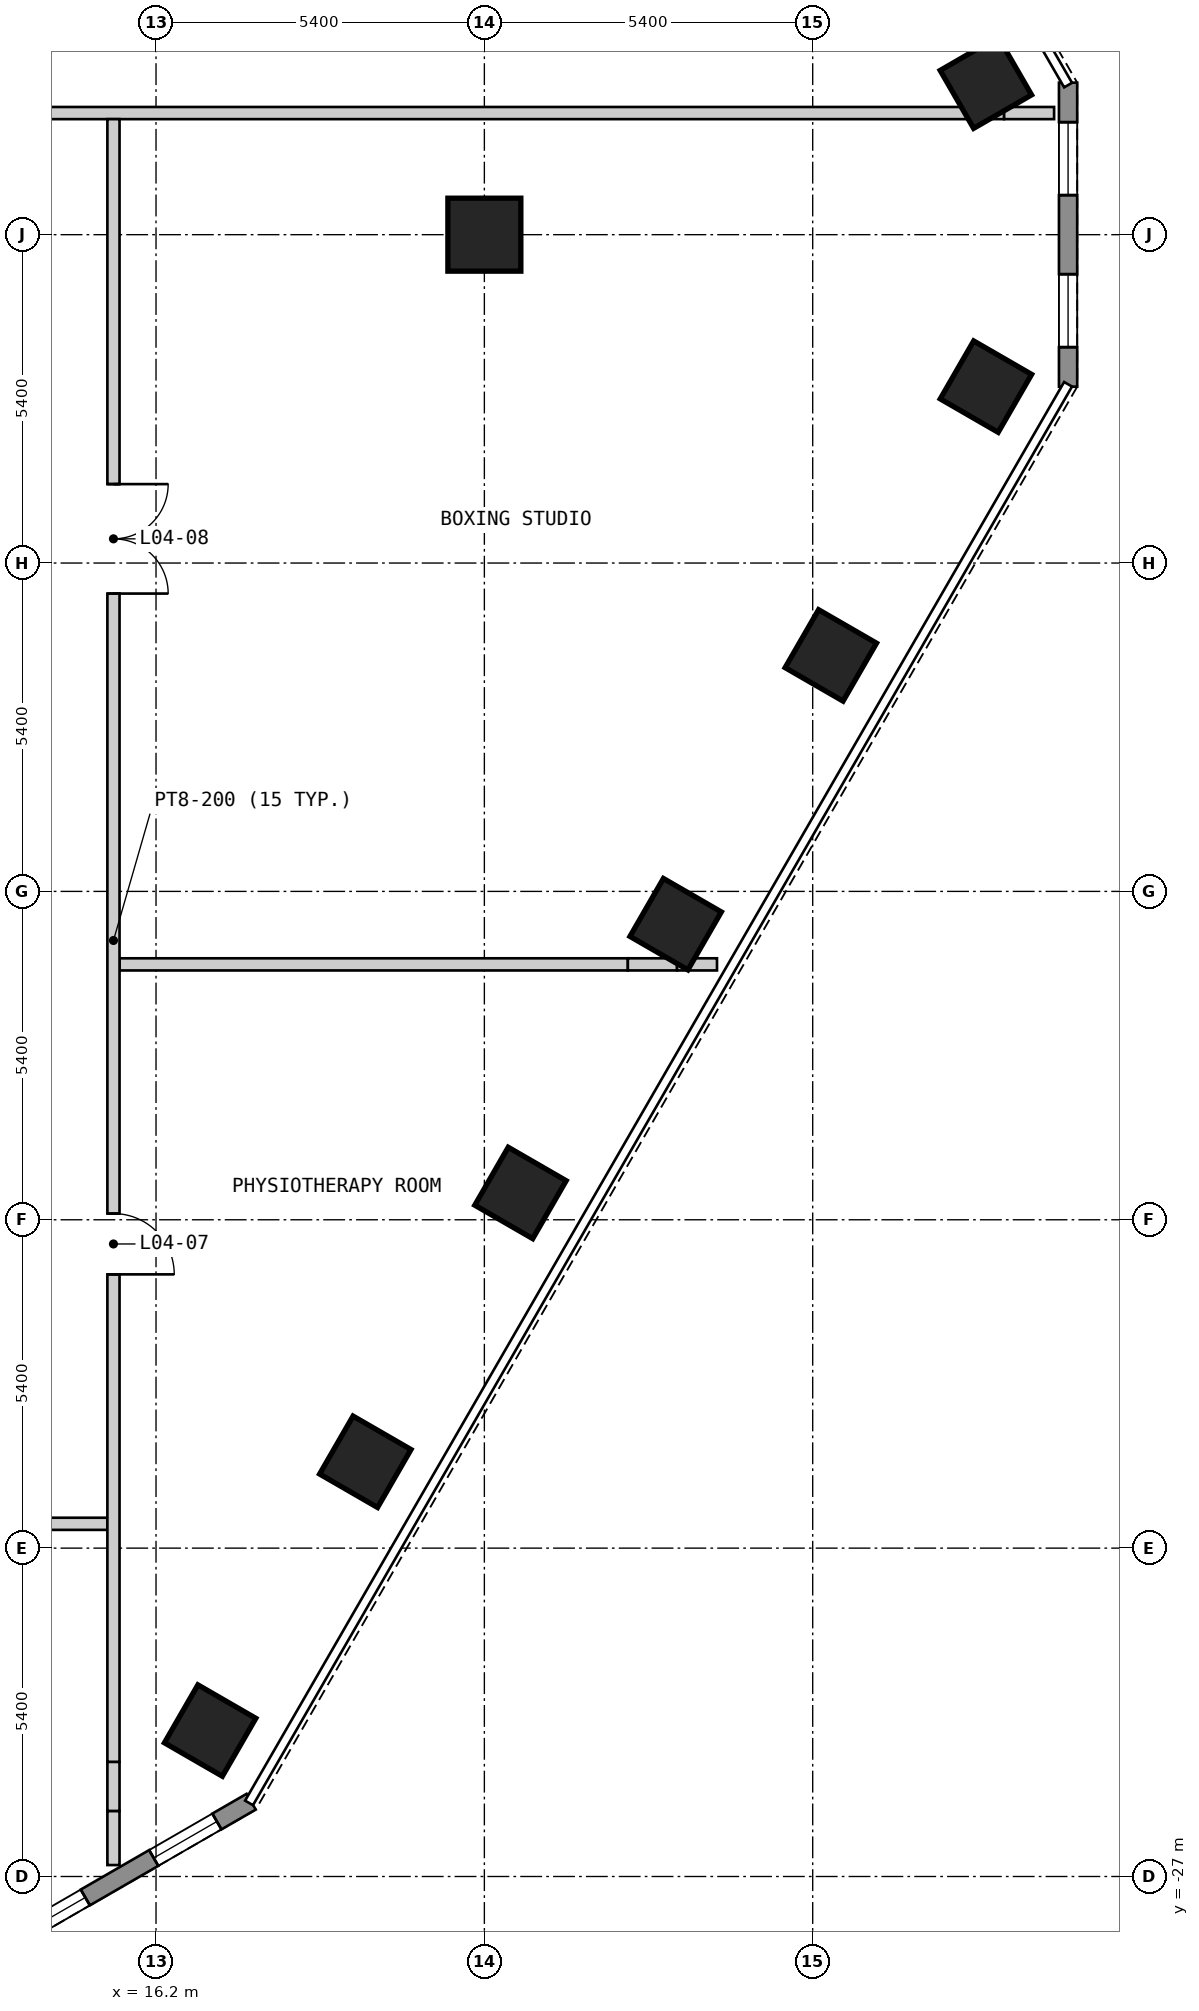
"""IFC4 building model, lengths in metres.
Left out: names, types, materials, properties, quantities, classifications, styles, units other than length and angle.
Written with IfcOpenShell. Run it as: python <this file> out.ifc"""

import sys

from ifc_helpers import new_model, si_unit, direction, frame, frame_2d, origin, origin_2d, place, context, subcontext, project, spatial, polyline, rectangle, outline, extrude, element, fill, save


model = new_model("IFC4")
c1 = context("Model", 3, precision=1e-05, world=origin(), true_north=direction((0.0, 1.0)))
c2 = subcontext(c1, "Body", "Model", "MODEL_VIEW")
j1 = project(units=[si_unit("LENGTHUNIT", "METRE"), si_unit("PLANEANGLEUNIT", "RADIAN")], contexts=[c1])
p1 = place(None, origin())
s1 = spatial("IfcSite", under=j1, at=p1, CompositionType="ELEMENT")
p2 = place(p1, origin())
s2 = spatial("IfcBuilding", under=s1, at=p2, CompositionType="ELEMENT")
p3 = place(p2, frame((0.0, 0.0, 16.2)))
s3 = spatial("IfcBuildingStorey", under=s2, at=p3, CompositionType="ELEMENT", Elevation=16.2)
for number, where, z_axis, x_axis in (
    (1, (17.09, -24.6, 0.0), (0.0, 0.0, 1.0), (0.5, 0.866, 0.0)),
    (2, (19.642, -20.18, 0.0), (0.0, 0.0, 1.0), (0.5, 0.866, 0.0)),
    (3, (22.194, -15.759, 0.0), (0.0, 0.0, 1.0), (0.5, 0.866, 0.0)),
    (4, (24.746, -11.339, 0.0), (0.0, 0.0, 1.0), (0.5, 0.866, 0.0)),
    (5, (27.298, -6.919, 0.0), (0.0, 0.0, 1.0), (0.5, 0.866, 0.0)),
    (6, (29.849, -2.499, 0.0), (0.0, 0.0, 1.0), (0.5, 0.866, 0.0)),
    (7, (29.848, 2.5, 0.0), (0.0, 0.0, 1.0), (-0.5, 0.866, 0.0)),
):
    element("IfcColumn", number, at=place(p3, frame(where, z_axis=z_axis, x_axis=x_axis)), inside=s3, PredefinedType="COLUMN", context=c2, shape_type="SweptSolid", body=[
        extrude(rectangle(XDim=1.1, YDim=1.1, at=origin_2d()), origin(), (0.0, 0.0, 1.0), 3.6),
    ])
p4 = place(p3, frame((21.6, 0.0, 0.0), z_axis=(0.0, 0.0, 1.0), x_axis=(1.0, 0.0, 0.0)))
e8 = element("IfcColumn", 8, at=p4, inside=s3, PredefinedType="COLUMN", context=c2, shape_type="SweptSolid", body=[
    extrude(rectangle(XDim=1.2, YDim=1.2, at=origin_2d()), origin(), (0.0, 0.0, 1.0), 3.6),
])
p5 = place(p3, frame((13.435, -28.27, 0.0), z_axis=(0.0, 0.0, 1.0), x_axis=(0.866010750942, 0.50002537861, 0.0)))
e9 = element("IfcWall", 9, at=p5, inside=s3, PredefinedType="SOLIDWALL", context=c2, shape_type="SweptSolid", body=[
    extrude(outline(polyline([(0.0, -0.15), (5.0, -0.15), (4.919, 0.15), (0.08, 0.15), (0.0, -0.15)])), origin(), (0.0, 0.0, 1.0), 3.25),
])
p6 = place(p5, frame((0.65, 0.0, 0.15)))
e10 = element("IfcOpeningElement", 10, at=p6, cuts=e9, PredefinedType="OPENING", context=c2, shape_type="SweptSolid", body=[
    extrude(rectangle(XDim=1.2, YDim=2.1, at=frame_2d((0.6, 1.05))), frame((0.0, 0.16, 0.0), z_axis=(0.0, -1.0, 0.0), x_axis=(1.0, 0.0, 0.0)), (0.0, 0.0, 1.0), 0.32),
])
p7 = place(p5, frame((3.149, 0.0, 0.15)))
e11 = element("IfcOpeningElement", 11, at=p7, cuts=e9, PredefinedType="OPENING", context=c2, shape_type="SweptSolid", body=[
    extrude(rectangle(XDim=1.2, YDim=2.1, at=frame_2d((0.6, 1.05))), frame((0.0, 0.16, 0.0), z_axis=(0.0, -1.0, 0.0), x_axis=(1.0, 0.0, 0.0)), (0.0, 0.0, 1.0), 0.32),
])
p8 = place(p3, frame((31.2, -2.5, 0.0), z_axis=(0.0, 0.0, 1.0), x_axis=(0.0, 1.0, 0.0)))
e12 = element("IfcWall", 12, at=p8, inside=s3, PredefinedType="SOLIDWALL", context=c2, shape_type="SweptSolid", body=[
    extrude(outline(polyline([(0.0, -0.15), (5.0, -0.15), (4.92, 0.15), (0.08, 0.15), (0.0, -0.15)])), origin(), (0.0, 0.0, 1.0), 3.25),
])
p9 = place(p8, frame((0.65, 0.0, 0.15)))
e13 = element("IfcOpeningElement", 13, at=p9, cuts=e12, PredefinedType="OPENING", context=c2, shape_type="SweptSolid", body=[
    extrude(rectangle(XDim=1.2, YDim=2.1, at=frame_2d((0.6, 1.05))), frame((0.0, 0.16, 0.0), z_axis=(0.0, -1.0, 0.0), x_axis=(1.0, 0.0, 0.0)), (0.0, 0.0, 1.0), 0.32),
])
p10 = place(p8, frame((3.15, 0.0, 0.15)))
e14 = element("IfcOpeningElement", 14, at=p10, cuts=e12, PredefinedType="OPENING", context=c2, shape_type="SweptSolid", body=[
    extrude(rectangle(XDim=1.2, YDim=2.1, at=frame_2d((0.6, 1.05))), frame((0.0, 0.16, 0.0), z_axis=(0.0, -1.0, 0.0), x_axis=(1.0, 0.0, 0.0)), (0.0, 0.0, 1.0), 0.32),
])
p11 = place(p3, frame((9.7, -21.2, 0.0), z_axis=(0.0, 0.0, 1.0), x_axis=(1.0, 0.0, 0.0)))
e15 = element("IfcWall", 15, at=p11, inside=s3, PredefinedType="PARTITIONING", context=c2, shape_type="SweptSolid", body=[
    extrude(rectangle(XDim=5.7, YDim=0.2, at=frame_2d((2.85, 0.0))), origin(), (0.0, 0.0, 1.0), 3.25),
])
p12 = place(p3, frame((15.6, -12.0, 0.0), z_axis=(0.0, 0.0, 1.0), x_axis=(1.0, 0.0, 0.0)))
e16 = element("IfcWall", 16, at=p12, inside=s3, PredefinedType="PARTITIONING", context=c2, shape_type="SweptSolid", body=[
    extrude(rectangle(XDim=8.36, YDim=0.2, at=frame_2d((4.18, 0.0))), origin(), (0.0, 0.0, 1.0), 3.25),
])
p13 = place(p3, frame((23.96, -12.0, 0.0), z_axis=(0.0, 0.0, 1.0), x_axis=(1.0, 0.0, 0.0)))
e17 = element("IfcWall", 17, at=p13, inside=s3, PredefinedType="PARTITIONING", context=c2, shape_type="SweptSolid", body=[
    extrude(rectangle(XDim=0.809, YDim=0.2, at=frame_2d((0.405, 0.0))), origin(), (0.0, 0.0, 1.0), 2.52),
])
p14 = place(p3, frame((24.769, -12.0, 0.0), z_axis=(0.0, 0.0, 1.0), x_axis=(1.0, 0.0, 0.0)))
e18 = element("IfcWall", 18, at=p14, inside=s3, PredefinedType="PARTITIONING", context=c2, shape_type="SweptSolid", body=[
    extrude(rectangle(XDim=0.657, YDim=0.2, at=frame_2d((0.329, 0.0))), origin(), (0.0, 0.0, 1.0), 3.25),
])
p15 = place(p3, frame((-29.549, 2.0, 0.0), z_axis=(0.0, 0.0, 1.0), x_axis=(1.0, 0.0, 0.0)))
e19 = element("IfcWall", 19, at=p15, inside=s3, PredefinedType="PARTITIONING", context=c2, shape_type="SweptSolid", body=[
    extrude(rectangle(XDim=59.097, YDim=0.2, at=frame_2d((29.549, 0.0))), origin(), (0.0, 0.0, 1.0), 3.25),
])
p16 = place(p15, frame((21.517, 0.0, 0.0)))
e20 = element("IfcOpeningElement", 20, at=p16, cuts=e19, PredefinedType="OPENING", context=c2, shape_type="SweptSolid", body=[
    extrude(rectangle(XDim=1.8, YDim=2.1, at=frame_2d((0.9, 1.05))), frame((0.0, 0.11, 0.0), z_axis=(0.0, -1.0, 0.0), x_axis=(1.0, 0.0, 0.0)), (0.0, 0.0, 1.0), 0.22),
])
p17 = place(p15, frame((35.781, 0.0, 0.0)))
e21 = element("IfcOpeningElement", 21, at=p17, cuts=e19, PredefinedType="OPENING", context=c2, shape_type="SweptSolid", body=[
    extrude(rectangle(XDim=1.8, YDim=2.1, at=frame_2d((0.9, 1.05))), frame((0.0, 0.11, 0.0), z_axis=(0.0, -1.0, 0.0), x_axis=(1.0, 0.0, 0.0)), (0.0, 0.0, 1.0), 0.22),
])
p18 = place(p3, frame((29.548, 2.0, 0.0), z_axis=(0.0, 0.0, 1.0), x_axis=(1.0, 0.0, 0.0)))
e22 = element("IfcWall", 22, at=p18, inside=s3, PredefinedType="PARTITIONING", context=c2, shape_type="SweptSolid", body=[
    extrude(rectangle(XDim=0.6, YDim=0.2, at=frame_2d((0.3, 0.0))), origin(), (0.0, 0.0, 1.0), 2.52),
])
p19 = place(p3, frame((30.148, 2.0, 0.0), z_axis=(0.0, 0.0, 1.0), x_axis=(1.0, 0.0, 0.0)))
e23 = element("IfcWall", 23, at=p19, inside=s3, PredefinedType="PARTITIONING", context=c2, shape_type="SweptSolid", body=[
    extrude(rectangle(XDim=0.822, YDim=0.2, at=frame_2d((0.411, 0.0))), origin(), (0.0, 0.0, 1.0), 3.25),
])
p20 = place(p3, frame((15.5, -26.812, 0.0), z_axis=(0.0, 0.0, 1.0), x_axis=(0.0, 1.0, 0.0)))
e24 = element("IfcWall", 24, at=p20, inside=s3, PredefinedType="PARTITIONING", context=c2, shape_type="SweptSolid", body=[
    extrude(rectangle(XDim=0.89, YDim=0.2, at=frame_2d((0.445, 0.0))), origin(), (0.0, 0.0, 1.0), 3.25),
])
p21 = place(p3, frame((15.5, -25.922, 0.0), z_axis=(0.0, 0.0, 1.0), x_axis=(0.0, 1.0, 0.0)))
e25 = element("IfcWall", 25, at=p21, inside=s3, PredefinedType="PARTITIONING", context=c2, shape_type="SweptSolid", body=[
    extrude(rectangle(XDim=0.808, YDim=0.2, at=frame_2d((0.404, 0.0))), origin(), (0.0, 0.0, 1.0), 2.52),
])
p22 = place(p3, frame((15.5, -25.114, 0.0), z_axis=(0.0, 0.0, 1.0), x_axis=(0.0, 1.0, 0.0)))
e26 = element("IfcWall", 26, at=p22, inside=s3, PredefinedType="PARTITIONING", context=c2, shape_type="SweptSolid", body=[
    extrude(rectangle(XDim=27.014, YDim=0.2, at=frame_2d((13.507, 0.0))), origin(), (0.0, 0.0, 1.0), 3.25),
])
p23 = place(p22, frame((9.016, 0.0, 0.0), z_axis=(0.0, 0.0, 1.0), x_axis=(-1.0, 0.0, 0.0)))
e27 = element("IfcOpeningElement", 27, at=p23, cuts=e26, PredefinedType="OPENING", context=c2, shape_type="SweptSolid", body=[
    extrude(rectangle(XDim=1.0, YDim=2.1, at=frame_2d((0.5, 1.05))), frame((0.0, 0.11, 0.0), z_axis=(0.0, -1.0, 0.0), x_axis=(1.0, 0.0, 0.0)), (0.0, 0.0, 1.0), 0.22),
])
p24 = place(p22, frame((21.012, 0.0, 0.0), z_axis=(0.0, 0.0, 1.0), x_axis=(-1.0, 0.0, 0.0)))
e28 = element("IfcOpeningElement", 28, at=p24, cuts=e26, PredefinedType="OPENING", context=c2, shape_type="SweptSolid", body=[
    extrude(rectangle(XDim=1.8, YDim=2.1, at=frame_2d((0.9, 1.05))), frame((0.0, 0.11, 0.0), z_axis=(0.0, -1.0, 0.0), x_axis=(1.0, 0.0, 0.0)), (0.0, 0.0, 1.0), 0.22),
])
p25 = place(p6, origin())
e29 = element("IfcWindow", 29, at=p25, inside=s3, PartitioningType="SINGLE_PANEL", PredefinedType="WINDOW", context=c2, shape_type="SweptSolid", body=[
    extrude(rectangle(XDim=1.2, YDim=2.1, at=frame_2d((0.6, 1.05))), frame((0.0, 0.03, 0.0), z_axis=(0.0, -1.0, 0.0), x_axis=(1.0, 0.0, 0.0)), (0.0, 0.0, 1.0), 0.06),
])
fill(e10, e29)
p26 = place(p7, origin())
e30 = element("IfcWindow", 30, at=p26, inside=s3, PartitioningType="SINGLE_PANEL", PredefinedType="WINDOW", context=c2, shape_type="SweptSolid", body=[
    extrude(rectangle(XDim=1.2, YDim=2.1, at=frame_2d((0.6, 1.05))), frame((0.0, 0.03, 0.0), z_axis=(0.0, -1.0, 0.0), x_axis=(1.0, 0.0, 0.0)), (0.0, 0.0, 1.0), 0.06),
])
fill(e11, e30)
p27 = place(p9, origin())
e31 = element("IfcWindow", 31, at=p27, inside=s3, PartitioningType="SINGLE_PANEL", PredefinedType="WINDOW", context=c2, shape_type="SweptSolid", body=[
    extrude(rectangle(XDim=1.2, YDim=2.1, at=frame_2d((0.6, 1.05))), frame((0.0, 0.03, 0.0), z_axis=(0.0, -1.0, 0.0), x_axis=(1.0, 0.0, 0.0)), (0.0, 0.0, 1.0), 0.06),
])
fill(e13, e31)
p28 = place(p10, origin())
e32 = element("IfcWindow", 32, at=p28, inside=s3, PartitioningType="SINGLE_PANEL", PredefinedType="WINDOW", context=c2, shape_type="SweptSolid", body=[
    extrude(rectangle(XDim=1.2, YDim=2.1, at=frame_2d((0.6, 1.05))), frame((0.0, 0.03, 0.0), z_axis=(0.0, -1.0, 0.0), x_axis=(1.0, 0.0, 0.0)), (0.0, 0.0, 1.0), 0.06),
])
fill(e14, e32)
p29 = place(p23, origin())
e33 = element("IfcDoor", 33, at=p29, inside=s3, OperationType="SINGLE_SWING_RIGHT", PredefinedType="DOOR", context=c2, shape_type="SweptSolid", body=[
    extrude(rectangle(XDim=1.0, YDim=2.1, at=frame_2d((0.5, 1.05))), frame((0.0, 0.025, 0.0), z_axis=(0.0, -1.0, 0.0), x_axis=(1.0, 0.0, 0.0)), (0.0, 0.0, 1.0), 0.05),
])
fill(e27, e33)
p30 = place(p24, origin())
e34 = element("IfcDoor", 34, at=p30, inside=s3, OperationType="DOUBLE_DOOR_SINGLE_SWING", PredefinedType="DOOR", context=c2, shape_type="SweptSolid", body=[
    extrude(rectangle(XDim=1.8, YDim=2.1, at=frame_2d((0.9, 1.05))), frame((0.0, 0.025, 0.0), z_axis=(0.0, -1.0, 0.0), x_axis=(1.0, 0.0, 0.0)), (0.0, 0.0, 1.0), 0.05),
])
fill(e28, e34)
save(model, sys.argv[1])
